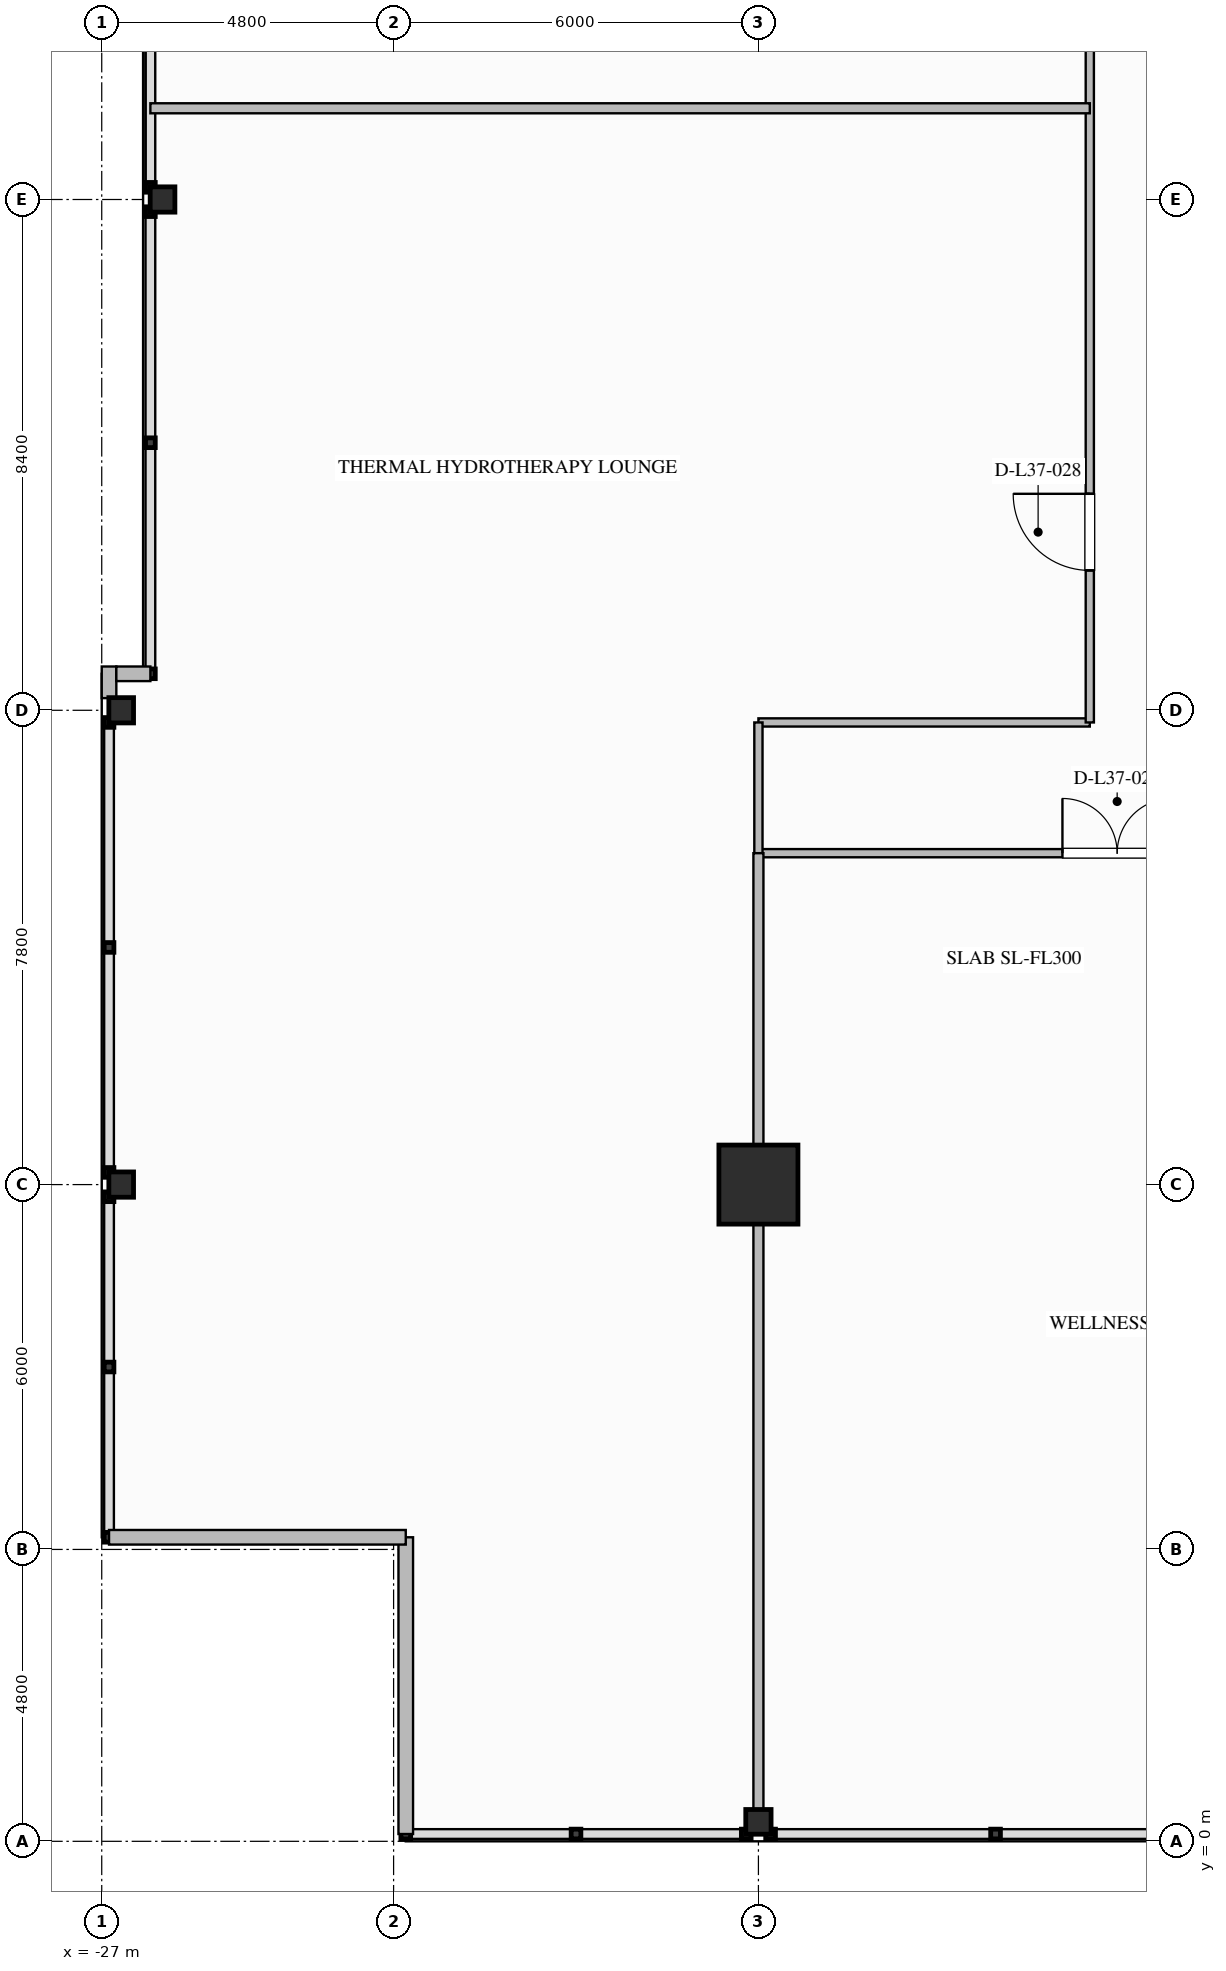
"""IFC4 building model, lengths in metres.
Left out: names, types, materials, properties, quantities, classifications, styles, units other than length and angle.
Written with IfcOpenShell. Run it as: python <this file> out.ifc"""

import sys

from ifc_helpers import new_model, si_unit, direction, frame, frame_2d, origin, origin_2d, place, context, subcontext, project, spatial, rectangle, i_section, extrude, element, fill, save


model = new_model("IFC4")
c1 = context("Model", 3, precision=1e-05, world=origin(), true_north=direction((0.0, 1.0)))
c2 = subcontext(c1, "Body", "Model", "MODEL_VIEW")
j1 = project(units=[si_unit("LENGTHUNIT", "METRE"), si_unit("PLANEANGLEUNIT", "RADIAN")], contexts=[c1])
p1 = place(None, origin())
s1 = spatial("IfcSite", under=j1, at=p1, CompositionType="ELEMENT")
p2 = place(p1, origin())
s2 = spatial("IfcBuilding", under=s1, at=p2, CompositionType="ELEMENT")
p3 = place(p2, frame((0.0, 0.0, 145.8)))
s3 = spatial("IfcBuildingStorey", under=s2, at=p3, CompositionType="ELEMENT", Elevation=145.8)
p4 = place(p3, frame((-16.2, 10.8, 0.0), z_axis=(0.0, 0.0, 1.0), x_axis=(1.0, 0.0, 0.0)))
e1 = element("IfcColumn", 1, at=p4, inside=s3, PredefinedType="COLUMN", context=c2, shape_type="SweptSolid", body=[
    extrude(rectangle(XDim=1.3, YDim=1.3, at=origin_2d()), origin(), (0.0, 0.0, 1.0), 4.6),
])
for number, where, z_axis, x_axis in (
    (2, (-26.68, 10.8, 0.0), (0.0, 0.0, 1.0), (1.0, 0.0, 0.0)),
    (3, (-26.68, 18.6, 0.0), (0.0, 0.0, 1.0), (1.0, 0.0, 0.0)),
    (4, (-26.0, 27.0, 0.0), (0.0, 0.0, 1.0), (1.0, 0.0, 0.0)),
    (5, (-16.2, 0.32, 0.0), (0.0, 0.0, 1.0), (0.0, 1.0, 0.0)),
):
    element("IfcColumn", number, at=place(p3, frame(where, z_axis=z_axis, x_axis=x_axis)), inside=s3, PredefinedType="COLUMN", context=c2, shape_type="SweptSolid", body=[
        extrude(i_section(OverallWidth=0.406, OverallDepth=0.416, WebThickness=0.03, FlangeThickness=0.048, FilletRadius=0.028, at=origin_2d()), origin(), (0.0, 0.0, 1.0), 4.597),
    ])
p5 = place(p3, frame((-26.88, 18.8, 0.0), z_axis=(0.0, 0.0, 1.0), x_axis=(0.0, 1.0, 0.0)))
e6 = element("IfcWall", 6, at=p5, inside=s3, PredefinedType="STANDARD", context=c2, shape_type="SweptSolid", body=[
    extrude(rectangle(XDim=0.52, YDim=0.24, at=frame_2d((0.26, 0.0))), origin(), (0.0, 0.0, 1.0), 4.34),
])
for number, where, z_axis, x_axis in (
    (7, (-22.0, 0.12, 0.0), (0.0, 0.0, 1.0), (0.0, 1.0, 0.0)),
    (8, (-22.0, 5.0, 0.0), (0.0, 0.0, 1.0), (-1.0, 0.0, 0.0)),
):
    element("IfcWall", number, at=place(p3, frame(where, z_axis=z_axis, x_axis=x_axis)), inside=s3, PredefinedType="STANDARD", context=c2, shape_type="SweptSolid", body=[
        extrude(rectangle(XDim=4.88, YDim=0.24, at=frame_2d((2.44, 0.0))), origin(), (0.0, 0.0, 1.0), 4.34),
    ])
p6 = place(p3, frame((-26.76, 19.2, 0.0), z_axis=(0.0, 0.0, 1.0), x_axis=(1.0, 0.0, 0.0)))
e9 = element("IfcWall", 9, at=p6, inside=s3, PredefinedType="STANDARD", context=c2, shape_type="SweptSolid", body=[
    extrude(rectangle(XDim=0.56, YDim=0.24, at=frame_2d((0.28, 0.0))), origin(), (0.0, 0.0, 1.0), 4.34),
])
p7 = place(p3, frame((-16.2, 16.25, 0.0), z_axis=(0.0, 0.0, 1.0), x_axis=(1.0, 0.0, 0.0)))
e10 = element("IfcWall", 10, at=p7, inside=s3, PredefinedType="PARTITIONING", context=c2, shape_type="SweptSolid", body=[
    extrude(rectangle(XDim=32.4, YDim=0.135, at=frame_2d((16.2, 0.0))), origin(), (0.0, 0.0, 1.0), 4.34),
])
p8 = place(p7, frame((5.0, 0.0, 0.0)))
e11 = element("IfcOpeningElement", 11, at=p8, cuts=e10, PredefinedType="OPENING", context=c2, shape_type="SweptSolid", body=[
    extrude(rectangle(XDim=1.8, YDim=2.35, at=frame_2d((0.9, 1.175))), frame((0.0, 0.077, 0.0), z_axis=(0.0, -1.0, 0.0), x_axis=(1.0, 0.0, 0.0)), (0.0, 0.0, 1.0), 0.155),
])
p9 = place(p7, frame((23.0, 0.0, 0.0)))
e12 = element("IfcOpeningElement", 12, at=p9, cuts=e10, PredefinedType="OPENING", context=c2, shape_type="SweptSolid", body=[
    extrude(rectangle(XDim=1.8, YDim=2.35, at=frame_2d((0.9, 1.175))), frame((0.0, 0.077, 0.0), z_axis=(0.0, -1.0, 0.0), x_axis=(1.0, 0.0, 0.0)), (0.0, 0.0, 1.0), 0.155),
])
p10 = place(p3, frame((-16.2, 18.4, 0.0), z_axis=(0.0, 0.0, 1.0), x_axis=(1.0, 0.0, 0.0)))
e13 = element("IfcWall", 13, at=p10, inside=s3, PredefinedType="PARTITIONING", context=c2, shape_type="SweptSolid", body=[
    extrude(rectangle(XDim=5.45, YDim=0.135, at=frame_2d((2.725, 0.0))), origin(), (0.0, 0.0, 1.0), 3.717),
])
p11 = place(p3, frame((-10.75, 18.4, 0.0), z_axis=(0.0, 0.0, 1.0), x_axis=(0.0, 1.0, 0.0)))
e14 = element("IfcWall", 14, at=p11, inside=s3, PredefinedType="PARTITIONING", context=c2, shape_type="SweptSolid", body=[
    extrude(rectangle(XDim=17.2, YDim=0.135, at=frame_2d((8.6, 0.0))), origin(), (0.0, 0.0, 1.0), 4.34),
])
p12 = place(p11, frame((2.5, 0.0, 0.0)))
e15 = element("IfcOpeningElement", 15, at=p12, cuts=e14, PredefinedType="OPENING", context=c2, shape_type="SweptSolid", body=[
    extrude(rectangle(XDim=1.26, YDim=2.2, at=frame_2d((0.63, 1.1))), frame((0.0, 0.077, 0.0), z_axis=(0.0, -1.0, 0.0), x_axis=(1.0, 0.0, 0.0)), (0.0, 0.0, 1.0), 0.155),
])
p13 = place(p11, frame((12.0, 0.0, 0.0)))
e16 = element("IfcOpeningElement", 16, at=p13, cuts=e14, PredefinedType="OPENING", context=c2, shape_type="SweptSolid", body=[
    extrude(rectangle(XDim=1.26, YDim=2.2, at=frame_2d((0.63, 1.1))), frame((0.0, 0.077, 0.0), z_axis=(0.0, -1.0, 0.0), x_axis=(1.0, 0.0, 0.0)), (0.0, 0.0, 1.0), 0.155),
])
p14 = place(p3, frame((-16.2, 16.25, 0.0), z_axis=(0.0, 0.0, 1.0), x_axis=(0.0, 1.0, 0.0)))
e17 = element("IfcWall", 17, at=p14, inside=s3, PredefinedType="PARTITIONING", context=c2, shape_type="SweptSolid", body=[
    extrude(rectangle(XDim=2.15, YDim=0.135, at=frame_2d((1.075, 0.0))), origin(), (0.0, 0.0, 1.0), 3.629),
])
p15 = place(p3, frame((-16.2, 0.12, 0.0), z_axis=(0.0, 0.0, 1.0), x_axis=(0.0, 1.0, 0.0)))
e18 = element("IfcWall", 18, at=p15, inside=s3, PredefinedType="PARTITIONING", context=c2, shape_type="SweptSolid", body=[
    extrude(rectangle(XDim=16.13, YDim=0.165, at=frame_2d((8.065, 0.0))), origin(), (0.0, 0.0, 1.0), 3.629),
])
p16 = place(p3, frame((-26.2, 28.5, 0.0), z_axis=(0.0, 0.0, 1.0), x_axis=(1.0, 0.0, 0.0)))
e19 = element("IfcWall", 19, at=p16, inside=s3, PredefinedType="PARTITIONING", context=c2, shape_type="SweptSolid", body=[
    extrude(rectangle(XDim=15.45, YDim=0.165, at=frame_2d((7.725, 0.0))), origin(), (0.0, 0.0, 1.0), 4.34),
])
p17 = place(p8, origin())
e20 = element("IfcDoor", 20, at=p17, inside=s3, OperationType="DOUBLE_DOOR_SINGLE_SWING", PredefinedType="DOOR", context=c2, shape_type="SweptSolid", body=[
    extrude(rectangle(XDim=1.8, YDim=2.35, at=frame_2d((0.9, 1.175))), frame((0.0, 0.025, 0.0), z_axis=(0.0, -1.0, 0.0), x_axis=(1.0, 0.0, 0.0)), (0.0, 0.0, 1.0), 0.05),
])
fill(e11, e20)
p18 = place(p12, origin())
e21 = element("IfcDoor", 21, at=p18, inside=s3, OperationType="SINGLE_SWING_RIGHT", PredefinedType="DOOR", context=c2, shape_type="SweptSolid", body=[
    extrude(rectangle(XDim=1.26, YDim=2.2, at=frame_2d((0.63, 1.1))), frame((0.0, 0.025, 0.0), z_axis=(0.0, -1.0, 0.0), x_axis=(1.0, 0.0, 0.0)), (0.0, 0.0, 1.0), 0.05),
])
fill(e15, e21)
save(model, sys.argv[1])
